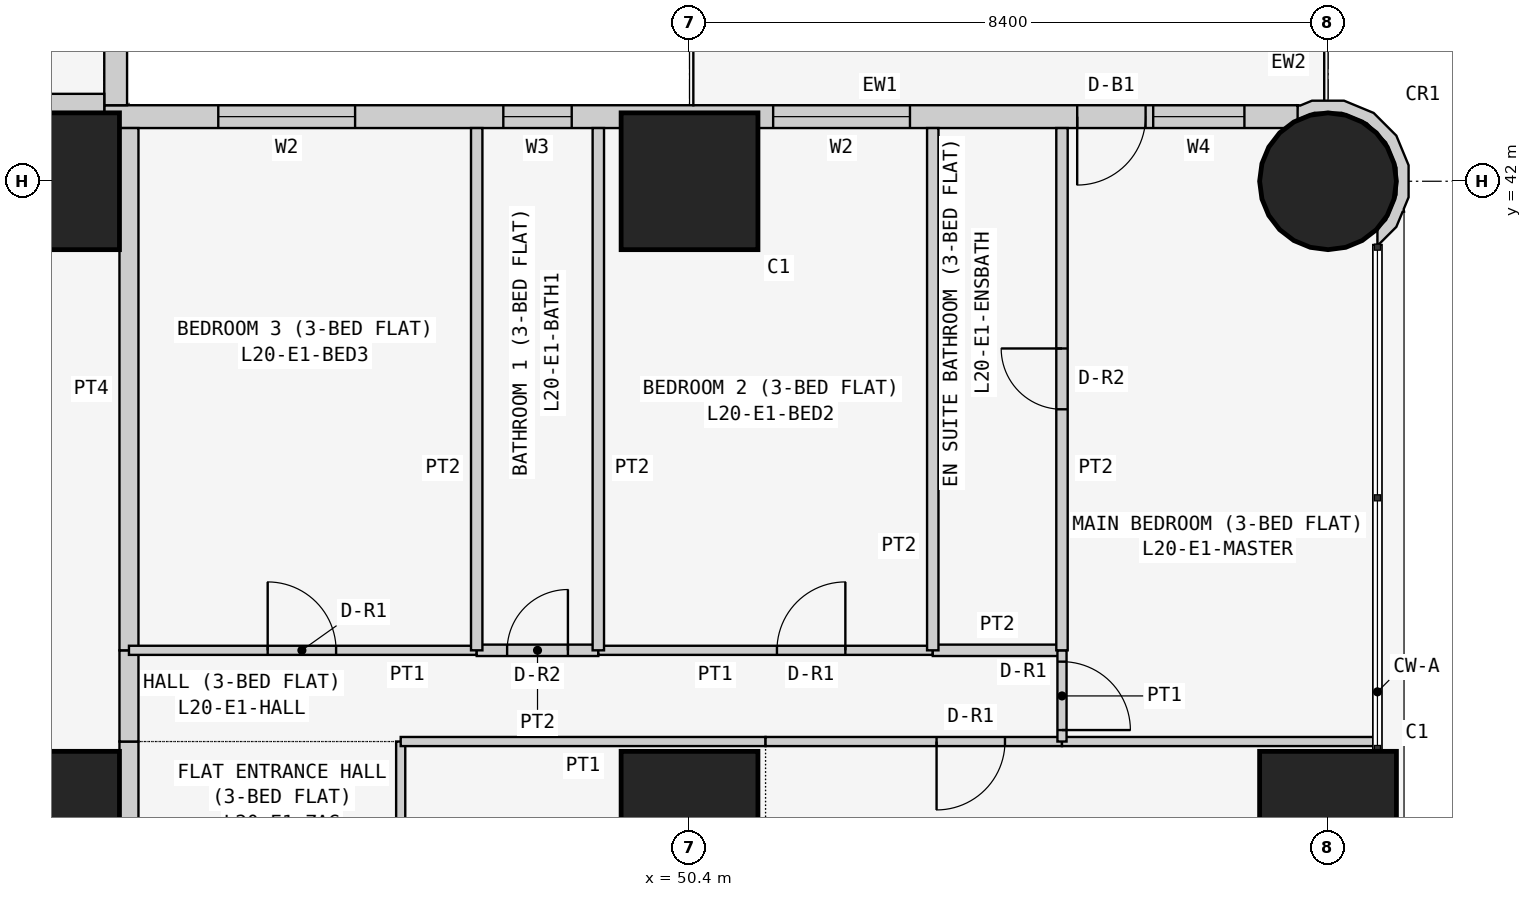
"""IFC4 building model, lengths in metres.
Left out: names, types, materials, properties, quantities, classifications, styles, units other than length and angle.
Written with IfcOpenShell. Run it as: python <this file> out.ifc"""

import sys

from ifc_helpers import new_model, si_unit, direction, frame, frame_2d, origin, origin_2d, place, context, subcontext, project, spatial, polyline, rectangle, circle, outline, extrude, element, fill, save


model = new_model("IFC4")
c1 = context("Model", 3, precision=1e-05, world=origin(), true_north=direction((0.0, 1.0)))
c2 = subcontext(c1, "Body", "Model", "MODEL_VIEW")
j1 = project(units=[si_unit("LENGTHUNIT", "METRE"), si_unit("PLANEANGLEUNIT", "RADIAN")], contexts=[c1])
p1 = place(None, origin())
s1 = spatial("IfcSite", under=j1, at=p1, CompositionType="ELEMENT")
p2 = place(p1, origin())
s2 = spatial("IfcBuilding", under=s1, at=p2, CompositionType="ELEMENT")
p3 = place(p2, frame((0.0, 0.0, 81.3)))
s3 = spatial("IfcBuildingStorey", under=s2, at=p3, CompositionType="ELEMENT", Elevation=81.3)
for number, where, z_axis, x_axis in (
    (1, (42.0, 33.6, 0.0), (0.0, 0.0, 1.0), (1.0, 0.0, 0.0)),
    (2, (42.0, 42.0, 0.0), (0.0, 0.0, 1.0), (1.0, 0.0, 0.0)),
    (3, (50.4, 33.6, 0.0), (0.0, 0.0, 1.0), (1.0, 0.0, 0.0)),
    (4, (50.4, 42.0, 0.0), (0.0, 0.0, 1.0), (1.0, 0.0, 0.0)),
    (5, (58.8, 33.6, 0.0), (0.0, 0.0, 1.0), (1.0, 0.0, 0.0)),
):
    element("IfcColumn", number, at=place(p3, frame(where, z_axis=z_axis, x_axis=x_axis)), inside=s3, PredefinedType="COLUMN", context=c2, shape_type="SweptSolid", body=[
        extrude(rectangle(XDim=1.8, YDim=1.8, at=origin_2d()), origin(), (0.0, 0.0, 1.0), 3.6),
    ])
p4 = place(p3, frame((58.8, 42.0, 0.0), z_axis=(0.0, 0.0, 1.0), x_axis=(1.0, 0.0, 0.0)))
e6 = element("IfcColumn", 6, at=p4, inside=s3, PredefinedType="COLUMN", context=c2, shape_type="SweptSolid", body=[
    extrude(circle(Radius=0.9, at=origin_2d()), origin(), (0.0, 0.0, 1.0), 3.6),
])
p5 = place(p3, frame((58.4, 42.85, 0.0), z_axis=(0.0, 0.0, 1.0), x_axis=(-1.0, 0.0, 0.0)))
e7 = element("IfcWall", 7, at=p5, inside=s3, PredefinedType="SOLIDWALL", context=c2, shape_type="SweptSolid", body=[
    extrude(rectangle(XDim=15.7, YDim=0.3, at=frame_2d((7.85, 0.0))), origin(), (0.0, 0.0, 1.0), 3.45),
])
p6 = place(p5, frame((12.4, 0.0, 0.9)))
e8 = element("IfcOpeningElement", 8, at=p6, cuts=e7, PredefinedType="OPENING", context=c2, shape_type="SweptSolid", body=[
    extrude(rectangle(XDim=1.8, YDim=1.5, at=frame_2d((0.9, 0.75))), frame((0.0, 0.16, 0.0), z_axis=(0.0, -1.0, 0.0), x_axis=(1.0, 0.0, 0.0)), (0.0, 0.0, 1.0), 0.32),
])
p7 = place(p5, frame((9.55, 0.0, 1.5)))
e9 = element("IfcOpeningElement", 9, at=p7, cuts=e7, PredefinedType="OPENING", context=c2, shape_type="SweptSolid", body=[
    extrude(rectangle(XDim=0.9, YDim=0.7, at=frame_2d((0.45, 0.35))), frame((0.0, 0.16, 0.0), z_axis=(0.0, -1.0, 0.0), x_axis=(1.0, 0.0, 0.0)), (0.0, 0.0, 1.0), 0.32),
])
p8 = place(p5, frame((5.1, 0.0, 0.9)))
e10 = element("IfcOpeningElement", 10, at=p8, cuts=e7, PredefinedType="OPENING", context=c2, shape_type="SweptSolid", body=[
    extrude(rectangle(XDim=1.8, YDim=1.5, at=frame_2d((0.9, 0.75))), frame((0.0, 0.16, 0.0), z_axis=(0.0, -1.0, 0.0), x_axis=(1.0, 0.0, 0.0)), (0.0, 0.0, 1.0), 0.32),
])
p9 = place(p5, frame((2.0, 0.0, 0.0)))
e11 = element("IfcOpeningElement", 11, at=p9, cuts=e7, PredefinedType="OPENING", context=c2, shape_type="SweptSolid", body=[
    extrude(rectangle(XDim=0.9, YDim=2.4, at=frame_2d((0.45, 1.2))), frame((0.0, 0.16, 0.0), z_axis=(0.0, -1.0, 0.0), x_axis=(1.0, 0.0, 0.0)), (0.0, 0.0, 1.0), 0.32),
])
p10 = place(p5, frame((0.7, 0.0, 0.9)))
e12 = element("IfcOpeningElement", 12, at=p10, cuts=e7, PredefinedType="OPENING", context=c2, shape_type="SweptSolid", body=[
    extrude(rectangle(XDim=1.2, YDim=1.5, at=frame_2d((0.6, 0.75))), frame((0.0, 0.16, 0.0), z_axis=(0.0, -1.0, 0.0), x_axis=(1.0, 0.0, 0.0)), (0.0, 0.0, 1.0), 0.32),
])
p11 = place(p3, frame((42.85, 43.0, 0.0), z_axis=(0.0, 0.0, 1.0), x_axis=(0.0, 1.0, 0.0)))
e13 = element("IfcWall", 13, at=p11, inside=s3, PredefinedType="SOLIDWALL", context=c2, shape_type="SweptSolid", body=[
    extrude(rectangle(XDim=15.4, YDim=0.3, at=frame_2d((7.7, 0.0))), origin(), (0.0, 0.0, 1.0), 3.45),
])
p12 = place(p11, frame((1.2, 0.0, 0.9)))
e14 = element("IfcOpeningElement", 14, at=p12, cuts=e13, PredefinedType="OPENING", context=c2, shape_type="SweptSolid", body=[
    extrude(rectangle(XDim=1.8, YDim=1.5, at=frame_2d((0.9, 0.75))), frame((0.0, 0.16, 0.0), z_axis=(0.0, -1.0, 0.0), x_axis=(1.0, 0.0, 0.0)), (0.0, 0.0, 1.0), 0.32),
])
p13 = place(p11, frame((4.95, 0.0, 1.5)))
e15 = element("IfcOpeningElement", 15, at=p13, cuts=e13, PredefinedType="OPENING", context=c2, shape_type="SweptSolid", body=[
    extrude(rectangle(XDim=0.9, YDim=0.7, at=frame_2d((0.45, 0.35))), frame((0.0, 0.16, 0.0), z_axis=(0.0, -1.0, 0.0), x_axis=(1.0, 0.0, 0.0)), (0.0, 0.0, 1.0), 0.32),
])
p14 = place(p11, frame((8.5, 0.0, 0.9)))
e16 = element("IfcOpeningElement", 16, at=p14, cuts=e13, PredefinedType="OPENING", context=c2, shape_type="SweptSolid", body=[
    extrude(rectangle(XDim=1.8, YDim=1.5, at=frame_2d((0.9, 0.75))), frame((0.0, 0.16, 0.0), z_axis=(0.0, -1.0, 0.0), x_axis=(1.0, 0.0, 0.0)), (0.0, 0.0, 1.0), 0.32),
])
p15 = place(p11, frame((12.5, 0.0, 0.0)))
e17 = element("IfcOpeningElement", 17, at=p15, cuts=e13, PredefinedType="OPENING", context=c2, shape_type="SweptSolid", body=[
    extrude(rectangle(XDim=0.9, YDim=2.4, at=frame_2d((0.45, 1.2))), frame((0.0, 0.16, 0.0), z_axis=(0.0, -1.0, 0.0), x_axis=(1.0, 0.0, 0.0)), (0.0, 0.0, 1.0), 0.32),
])
p16 = place(p11, frame((13.5, 0.0, 0.9)))
e18 = element("IfcOpeningElement", 18, at=p16, cuts=e13, PredefinedType="OPENING", context=c2, shape_type="SweptSolid", body=[
    extrude(rectangle(XDim=1.2, YDim=1.5, at=frame_2d((0.6, 0.75))), frame((0.0, 0.16, 0.0), z_axis=(0.0, -1.0, 0.0), x_axis=(1.0, 0.0, 0.0)), (0.0, 0.0, 1.0), 0.32),
])
p17 = place(p3, frame((59.411, 41.233, 0.0), z_axis=(0.0, 0.0, 1.0), x_axis=(0.926129809145, 0.377204953059, 0.0)))
e19 = element("IfcWall", 19, at=p17, inside=s3, PredefinedType="SOLIDWALL", context=c2, shape_type="SweptSolid", body=[
    extrude(outline(polyline([(0.626, 0.345), (0.785, 0.736), (0.782, 1.157), (0.619, 1.546), (0.319, 1.843), (-0.072, 2.002), (-0.24, 2.001), (-0.27, 2.017), (-0.37, 1.841), (-0.102, 1.842), (0.23, 1.707), (0.485, 1.455), (0.624, 1.125), (0.626, 0.766), (0.491, 0.434), (0.238, 0.179), (0.09, 0.117), (0.011, -0.078), (0.024, -0.083), (0.329, 0.045), (0.48, 0.198), (0.499, 0.193), (0.508, 0.225), (0.626, 0.345)])), origin(), (0.0, 0.0, 1.0), 3.45),
])
p18 = place(p3, frame((35.829, 43.025, 0.0), z_axis=(0.0, 0.0, 1.0), x_axis=(1.0, 0.0, 0.0)))
e20 = element("IfcWall", 20, at=p18, inside=s3, PredefinedType="PARTITIONING", context=c2, shape_type="SweptSolid", body=[
    extrude(rectangle(XDim=6.871, YDim=0.25, at=frame_2d((3.436, 0.0))), origin(), (0.0, 0.0, 1.0), 3.45),
])
p19 = place(p3, frame((43.025, 34.629, 0.0), z_axis=(0.0, 0.0, 1.0), x_axis=(0.0, -1.0, 0.0)))
e21 = element("IfcWall", 21, at=p19, inside=s3, PredefinedType="PARTITIONING", context=c2, shape_type="SweptSolid", body=[
    extrude(rectangle(XDim=5.229, YDim=0.25, at=frame_2d((2.615, 0.0))), origin(), (0.0, 0.0, 1.0), 3.45),
])
p20 = place(p19, frame((2.129, 0.0, 0.0)))
e22 = element("IfcOpeningElement", 22, at=p20, cuts=e21, PredefinedType="OPENING", context=c2, shape_type="SweptSolid", body=[
    extrude(rectangle(XDim=1.0, YDim=2.1, at=frame_2d((0.5, 1.05))), frame((0.0, 0.135, 0.0), z_axis=(0.0, -1.0, 0.0), x_axis=(1.0, 0.0, 0.0)), (0.0, 0.0, 1.0), 0.27),
])
p21 = place(p3, frame((43.025, 35.829, 0.0), z_axis=(0.0, 0.0, 1.0), x_axis=(0.0, -1.0, 0.0)))
e23 = element("IfcWall", 23, at=p21, inside=s3, PredefinedType="PARTITIONING", context=c2, shape_type="SweptSolid", body=[
    extrude(rectangle(XDim=1.2, YDim=0.25, at=frame_2d((0.6, 0.0))), origin(), (0.0, 0.0, 1.0), 3.45),
])
p22 = place(p3, frame((43.025, 42.7, 0.0), z_axis=(0.0, 0.0, 1.0), x_axis=(0.0, -1.0, 0.0)))
e24 = element("IfcWall", 24, at=p22, inside=s3, PredefinedType="PARTITIONING", context=c2, shape_type="SweptSolid", body=[
    extrude(rectangle(XDim=6.871, YDim=0.25, at=frame_2d((3.436, 0.0))), origin(), (0.0, 0.0, 1.0), 3.45),
])
p23 = place(p3, frame((46.6, 29.4, 0.0), z_axis=(0.0, 0.0, 1.0), x_axis=(0.0, 1.0, 0.0)))
e25 = element("IfcWall", 25, at=p23, inside=s3, PredefinedType="PARTITIONING", context=c2, shape_type="SweptSolid", body=[
    extrude(rectangle(XDim=5.229, YDim=0.12, at=frame_2d((2.615, 0.0))), origin(), (0.0, 0.0, 1.0), 3.45),
])
p24 = place(p23, frame((1.05, 0.0, 0.0)))
e26 = element("IfcOpeningElement", 26, at=p24, cuts=e25, PredefinedType="OPENING", context=c2, shape_type="SweptSolid", body=[
    extrude(rectangle(XDim=0.9, YDim=2.1, at=frame_2d((0.45, 1.05))), frame((0.0, 0.07, 0.0), z_axis=(0.0, -1.0, 0.0), x_axis=(1.0, 0.0, 0.0)), (0.0, 0.0, 1.0), 0.14),
])
p25 = place(p3, frame((51.4, 34.629, 0.0), z_axis=(0.0, 0.0, 1.0), x_axis=(-1.0, 0.0, 0.0)))
e27 = element("IfcWall", 27, at=p25, inside=s3, PredefinedType="PARTITIONING", context=c2, shape_type="SweptSolid", body=[
    extrude(rectangle(XDim=4.8, YDim=0.12, at=frame_2d((2.4, 0.0))), origin(), (0.0, 0.0, 1.0), 3.45),
])
p26 = place(p3, frame((55.3, 34.629, 0.0), z_axis=(0.0, 0.0, 1.0), x_axis=(-1.0, 0.0, 0.0)))
e28 = element("IfcWall", 28, at=p26, inside=s3, PredefinedType="PARTITIONING", context=c2, shape_type="SweptSolid", body=[
    extrude(rectangle(XDim=3.9, YDim=0.12, at=frame_2d((1.95, 0.0))), origin(), (0.0, 0.0, 1.0), 3.45),
])
p27 = place(p26, frame((0.75, 0.0, 0.0)))
e29 = element("IfcOpeningElement", 29, at=p27, cuts=e28, PredefinedType="OPENING", context=c2, shape_type="SweptSolid", body=[
    extrude(rectangle(XDim=0.9, YDim=2.1, at=frame_2d((0.45, 1.05))), frame((0.0, 0.07, 0.0), z_axis=(0.0, -1.0, 0.0), x_axis=(1.0, 0.0, 0.0)), (0.0, 0.0, 1.0), 0.14),
])
p28 = place(p3, frame((59.45, 34.629, 0.0), z_axis=(0.0, 0.0, 1.0), x_axis=(-1.0, 0.0, 0.0)))
e30 = element("IfcWall", 30, at=p28, inside=s3, PredefinedType="PARTITIONING", context=c2, shape_type="SweptSolid", body=[
    extrude(rectangle(XDim=4.15, YDim=0.12, at=frame_2d((2.075, 0.0))), origin(), (0.0, 0.0, 1.0), 3.45),
])
p29 = place(p3, frame((47.6, 35.829, 0.0), z_axis=(0.0, 0.0, 1.0), x_axis=(-1.0, 0.0, 0.0)))
e31 = element("IfcWall", 31, at=p29, inside=s3, PredefinedType="PARTITIONING", context=c2, shape_type="SweptSolid", body=[
    extrude(rectangle(XDim=4.575, YDim=0.12, at=frame_2d((2.288, 0.0))), origin(), (0.0, 0.0, 1.0), 3.45),
])
p30 = place(p29, frame((1.85, 0.0, 0.0)))
e32 = element("IfcOpeningElement", 32, at=p30, cuts=e31, PredefinedType="OPENING", context=c2, shape_type="SweptSolid", body=[
    extrude(rectangle(XDim=0.9, YDim=2.1, at=frame_2d((0.45, 1.05))), frame((0.0, 0.07, 0.0), z_axis=(0.0, -1.0, 0.0), x_axis=(1.0, 0.0, 0.0)), (0.0, 0.0, 1.0), 0.14),
])
p31 = place(p3, frame((49.2, 35.829, 0.0), z_axis=(0.0, 0.0, 1.0), x_axis=(-1.0, 0.0, 0.0)))
e33 = element("IfcWall", 33, at=p31, inside=s3, PredefinedType="PARTITIONING", context=c2, shape_type="SweptSolid", body=[
    extrude(rectangle(XDim=1.6, YDim=0.15, at=frame_2d((0.8, 0.0))), origin(), (0.0, 0.0, 1.0), 3.45),
])
p32 = place(p31, frame((0.4, 0.0, 0.0)))
e34 = element("IfcOpeningElement", 34, at=p32, cuts=e33, PredefinedType="OPENING", context=c2, shape_type="SweptSolid", body=[
    extrude(rectangle(XDim=0.8, YDim=2.1, at=frame_2d((0.4, 1.05))), frame((0.0, 0.085, 0.0), z_axis=(0.0, -1.0, 0.0), x_axis=(1.0, 0.0, 0.0)), (0.0, 0.0, 1.0), 0.17),
])
p33 = place(p3, frame((53.6, 35.829, 0.0), z_axis=(0.0, 0.0, 1.0), x_axis=(-1.0, 0.0, 0.0)))
e35 = element("IfcWall", 35, at=p33, inside=s3, PredefinedType="PARTITIONING", context=c2, shape_type="SweptSolid", body=[
    extrude(rectangle(XDim=4.4, YDim=0.12, at=frame_2d((2.2, 0.0))), origin(), (0.0, 0.0, 1.0), 3.45),
])
p34 = place(p33, frame((1.15, 0.0, 0.0)))
e36 = element("IfcOpeningElement", 36, at=p34, cuts=e35, PredefinedType="OPENING", context=c2, shape_type="SweptSolid", body=[
    extrude(rectangle(XDim=0.9, YDim=2.1, at=frame_2d((0.45, 1.05))), frame((0.0, 0.07, 0.0), z_axis=(0.0, -1.0, 0.0), x_axis=(1.0, 0.0, 0.0)), (0.0, 0.0, 1.0), 0.14),
])
p35 = place(p3, frame((55.3, 35.829, 0.0), z_axis=(0.0, 0.0, 1.0), x_axis=(-1.0, 0.0, 0.0)))
e37 = element("IfcWall", 37, at=p35, inside=s3, PredefinedType="PARTITIONING", context=c2, shape_type="SweptSolid", body=[
    extrude(rectangle(XDim=1.7, YDim=0.15, at=frame_2d((0.85, 0.0))), origin(), (0.0, 0.0, 1.0), 3.45),
])
p36 = place(p3, frame((55.3, 34.629, 0.0), z_axis=(0.0, 0.0, 1.0), x_axis=(0.0, 1.0, 0.0)))
e38 = element("IfcWall", 38, at=p36, inside=s3, PredefinedType="PARTITIONING", context=c2, shape_type="SweptSolid", body=[
    extrude(rectangle(XDim=1.2, YDim=0.12, at=frame_2d((0.6, 0.0))), origin(), (0.0, 0.0, 1.0), 3.45),
])
p37 = place(p36, frame((0.151, 0.0, 0.0)))
e39 = element("IfcOpeningElement", 39, at=p37, cuts=e38, PredefinedType="OPENING", context=c2, shape_type="SweptSolid", body=[
    extrude(rectangle(XDim=0.9, YDim=2.1, at=frame_2d((0.45, 1.05))), frame((0.0, 0.07, 0.0), z_axis=(0.0, -1.0, 0.0), x_axis=(1.0, 0.0, 0.0)), (0.0, 0.0, 1.0), 0.14),
])
for number, where, z_axis, x_axis in (
    (40, (47.6, 35.829, 0.0), (0.0, 0.0, 1.0), (0.0, 1.0, 0.0)),
    (41, (49.2, 35.829, 0.0), (0.0, 0.0, 1.0), (0.0, 1.0, 0.0)),
    (42, (53.6, 35.829, 0.0), (0.0, 0.0, 1.0), (0.0, 1.0, 0.0)),
):
    element("IfcWall", number, at=place(p3, frame(where, z_axis=z_axis, x_axis=x_axis)), inside=s3, PredefinedType="PARTITIONING", context=c2, shape_type="SweptSolid", body=[
        extrude(rectangle(XDim=6.871, YDim=0.15, at=frame_2d((3.436, 0.0))), origin(), (0.0, 0.0, 1.0), 3.45),
    ])
p38 = place(p3, frame((55.3, 35.829, 0.0), z_axis=(0.0, 0.0, 1.0), x_axis=(0.0, 1.0, 0.0)))
e43 = element("IfcWall", 43, at=p38, inside=s3, PredefinedType="PARTITIONING", context=c2, shape_type="SweptSolid", body=[
    extrude(rectangle(XDim=6.871, YDim=0.15, at=frame_2d((3.436, 0.0))), origin(), (0.0, 0.0, 1.0), 3.45),
])
p39 = place(p38, frame((3.171, 0.0, 0.0)))
e44 = element("IfcOpeningElement", 44, at=p39, cuts=e43, PredefinedType="OPENING", context=c2, shape_type="SweptSolid", body=[
    extrude(rectangle(XDim=0.8, YDim=2.1, at=frame_2d((0.4, 1.05))), frame((0.0, 0.085, 0.0), z_axis=(0.0, -1.0, 0.0), x_axis=(1.0, 0.0, 0.0)), (0.0, 0.0, 1.0), 0.17),
])
p40 = place(p6, origin())
e45 = element("IfcWindow", 45, at=p40, inside=s3, PartitioningType="SINGLE_PANEL", PredefinedType="WINDOW", context=c2, shape_type="SweptSolid", body=[
    extrude(rectangle(XDim=1.8, YDim=1.5, at=frame_2d((0.9, 0.75))), frame((0.0, 0.03, 0.0), z_axis=(0.0, -1.0, 0.0), x_axis=(1.0, 0.0, 0.0)), (0.0, 0.0, 1.0), 0.06),
])
fill(e8, e45)
p41 = place(p7, origin())
e46 = element("IfcWindow", 46, at=p41, inside=s3, PartitioningType="SINGLE_PANEL", PredefinedType="WINDOW", context=c2, shape_type="SweptSolid", body=[
    extrude(rectangle(XDim=0.9, YDim=0.7, at=frame_2d((0.45, 0.35))), frame((0.0, 0.03, 0.0), z_axis=(0.0, -1.0, 0.0), x_axis=(1.0, 0.0, 0.0)), (0.0, 0.0, 1.0), 0.06),
])
fill(e9, e46)
p42 = place(p8, origin())
e47 = element("IfcWindow", 47, at=p42, inside=s3, PartitioningType="SINGLE_PANEL", PredefinedType="WINDOW", context=c2, shape_type="SweptSolid", body=[
    extrude(rectangle(XDim=1.8, YDim=1.5, at=frame_2d((0.9, 0.75))), frame((0.0, 0.03, 0.0), z_axis=(0.0, -1.0, 0.0), x_axis=(1.0, 0.0, 0.0)), (0.0, 0.0, 1.0), 0.06),
])
fill(e10, e47)
p43 = place(p9, origin())
e48 = element("IfcDoor", 48, at=p43, inside=s3, OperationType="SINGLE_SWING_RIGHT", PredefinedType="DOOR", context=c2, shape_type="SweptSolid", body=[
    extrude(rectangle(XDim=0.9, YDim=2.4, at=frame_2d((0.45, 1.2))), frame((0.0, 0.025, 0.0), z_axis=(0.0, -1.0, 0.0), x_axis=(1.0, 0.0, 0.0)), (0.0, 0.0, 1.0), 0.05),
])
fill(e11, e48)
p44 = place(p10, origin())
e49 = element("IfcWindow", 49, at=p44, inside=s3, PartitioningType="SINGLE_PANEL", PredefinedType="WINDOW", context=c2, shape_type="SweptSolid", body=[
    extrude(rectangle(XDim=1.2, YDim=1.5, at=frame_2d((0.6, 0.75))), frame((0.0, 0.03, 0.0), z_axis=(0.0, -1.0, 0.0), x_axis=(1.0, 0.0, 0.0)), (0.0, 0.0, 1.0), 0.06),
])
fill(e12, e49)
p45 = place(p27, origin())
e50 = element("IfcDoor", 50, at=p45, inside=s3, OperationType="SINGLE_SWING_RIGHT", PredefinedType="DOOR", context=c2, shape_type="SweptSolid", body=[
    extrude(rectangle(XDim=0.9, YDim=2.1, at=frame_2d((0.45, 1.05))), frame((0.0, 0.025, 0.0), z_axis=(0.0, -1.0, 0.0), x_axis=(1.0, 0.0, 0.0)), (0.0, 0.0, 1.0), 0.05),
])
fill(e29, e50)
p46 = place(p30, frame((0.9, 0.0, 0.0), z_axis=(0.0, 0.0, 1.0), x_axis=(-1.0, 0.0, 0.0)))
e51 = element("IfcDoor", 51, at=p46, inside=s3, OperationType="SINGLE_SWING_LEFT", PredefinedType="DOOR", context=c2, shape_type="SweptSolid", body=[
    extrude(rectangle(XDim=0.9, YDim=2.1, at=frame_2d((0.45, 1.05))), frame((0.0, 0.025, 0.0), z_axis=(0.0, -1.0, 0.0), x_axis=(1.0, 0.0, 0.0)), (0.0, 0.0, 1.0), 0.05),
])
fill(e32, e51)
p47 = place(p32, frame((0.8, 0.0, 0.0), z_axis=(0.0, 0.0, 1.0), x_axis=(-1.0, 0.0, 0.0)))
e52 = element("IfcDoor", 52, at=p47, inside=s3, OperationType="SINGLE_SWING_RIGHT", PredefinedType="DOOR", context=c2, shape_type="SweptSolid", body=[
    extrude(rectangle(XDim=0.8, YDim=2.1, at=frame_2d((0.4, 1.05))), frame((0.0, 0.025, 0.0), z_axis=(0.0, -1.0, 0.0), x_axis=(1.0, 0.0, 0.0)), (0.0, 0.0, 1.0), 0.05),
])
fill(e34, e52)
p48 = place(p34, frame((0.9, 0.0, 0.0), z_axis=(0.0, 0.0, 1.0), x_axis=(-1.0, 0.0, 0.0)))
e53 = element("IfcDoor", 53, at=p48, inside=s3, OperationType="SINGLE_SWING_RIGHT", PredefinedType="DOOR", context=c2, shape_type="SweptSolid", body=[
    extrude(rectangle(XDim=0.9, YDim=2.1, at=frame_2d((0.45, 1.05))), frame((0.0, 0.025, 0.0), z_axis=(0.0, -1.0, 0.0), x_axis=(1.0, 0.0, 0.0)), (0.0, 0.0, 1.0), 0.05),
])
fill(e36, e53)
p49 = place(p37, frame((0.9, 0.0, 0.0), z_axis=(0.0, 0.0, 1.0), x_axis=(-1.0, 0.0, 0.0)))
e54 = element("IfcDoor", 54, at=p49, inside=s3, OperationType="SINGLE_SWING_RIGHT", PredefinedType="DOOR", context=c2, shape_type="SweptSolid", body=[
    extrude(rectangle(XDim=0.9, YDim=2.1, at=frame_2d((0.45, 1.05))), frame((0.0, 0.025, 0.0), z_axis=(0.0, -1.0, 0.0), x_axis=(1.0, 0.0, 0.0)), (0.0, 0.0, 1.0), 0.05),
])
fill(e39, e54)
p50 = place(p39, origin())
e55 = element("IfcDoor", 55, at=p50, inside=s3, OperationType="SINGLE_SWING_RIGHT", PredefinedType="DOOR", context=c2, shape_type="SweptSolid", body=[
    extrude(rectangle(XDim=0.8, YDim=2.1, at=frame_2d((0.4, 1.05))), frame((0.0, 0.025, 0.0), z_axis=(0.0, -1.0, 0.0), x_axis=(1.0, 0.0, 0.0)), (0.0, 0.0, 1.0), 0.05),
])
fill(e44, e55)
save(model, sys.argv[1])
